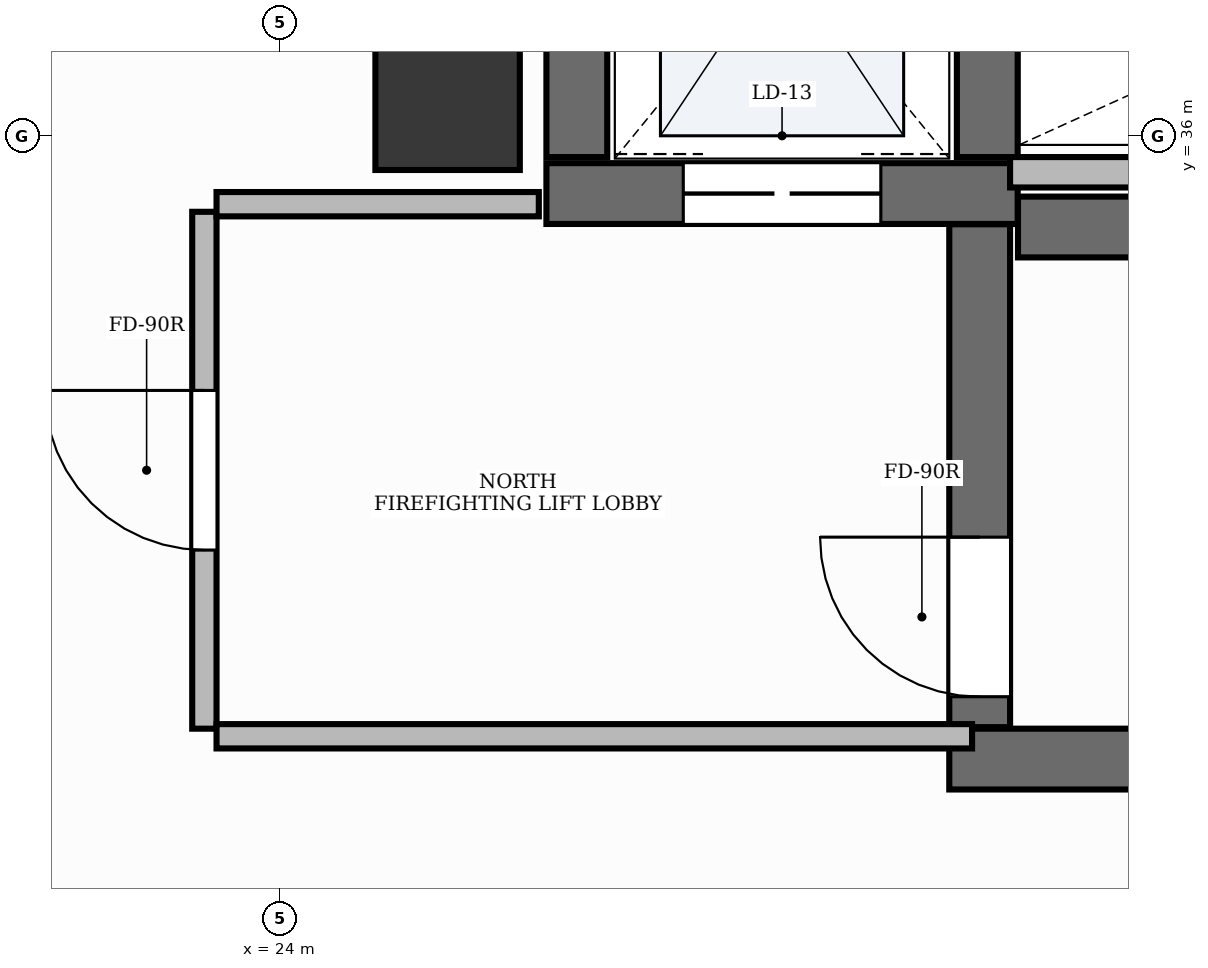
"""IFC4 building model, lengths in metres.
Left out: names, types, materials, properties, quantities, classifications, styles, units other than length and angle.
Written with IfcOpenShell. Run it as: python <this file> out.ifc"""

import sys

from ifc_helpers import new_model, si_unit, direction, frame, frame_2d, origin, origin_2d, place, context, subcontext, project, spatial, rectangle, extrude, element, fill, save


model = new_model("IFC4")
c1 = context("Model", 3, precision=1e-05, world=origin(), true_north=direction((0.0, 1.0)))
c2 = subcontext(c1, "Body", "Model", "MODEL_VIEW")
j1 = project(units=[si_unit("LENGTHUNIT", "METRE"), si_unit("PLANEANGLEUNIT", "RADIAN")], contexts=[c1])
p1 = place(None, origin())
s1 = spatial("IfcSite", under=j1, at=p1, CompositionType="ELEMENT")
p2 = place(p1, origin())
s2 = spatial("IfcBuilding", under=s1, at=p2, CompositionType="ELEMENT")
p3 = place(p2, frame((0.0, 0.0, 154.2)))
s3 = spatial("IfcBuildingStorey", under=s2, at=p3, CompositionType="ELEMENT", Elevation=154.2)
p4 = place(p3, frame((28.852, 35.4, 0.0), z_axis=(0.0, 0.0, 1.0), x_axis=(1.0, 0.0, 0.0)))
e1 = element("IfcWall", 1, at=p4, inside=s3, PredefinedType="SHEAR", context=c2, shape_type="SweptSolid", body=[
    extrude(rectangle(XDim=8.198, YDim=0.4, at=frame_2d((4.099, 0.0))), origin(), (0.0, 0.0, 1.0), 3.9),
])
p5 = place(p3, frame((28.4, 31.9, 0.0), z_axis=(0.0, 0.0, 1.0), x_axis=(1.0, 0.0, 0.0)))
e2 = element("IfcWall", 2, at=p5, inside=s3, PredefinedType="SHEAR", context=c2, shape_type="SweptSolid", body=[
    extrude(rectangle(XDim=8.65, YDim=0.4, at=frame_2d((4.325, 0.0))), origin(), (0.0, 0.0, 1.0), 3.9),
])
p6 = place(p3, frame((28.6, 32.11, 0.0), z_axis=(0.0, 0.0, 1.0), x_axis=(0.0, 1.0, 0.0)))
e3 = element("IfcWall", 3, at=p6, inside=s3, PredefinedType="SHEAR", context=c2, shape_type="SweptSolid", body=[
    extrude(rectangle(XDim=3.308, YDim=0.4, at=frame_2d((1.654, 0.0))), origin(), (0.0, 0.0, 1.0), 3.9),
])
p7 = place(p6, frame((0.2, 0.0, 0.0)))
e4 = element("IfcOpeningElement", 4, at=p7, cuts=e3, PredefinedType="OPENING", context=c2, shape_type="SweptSolid", body=[
    extrude(rectangle(XDim=1.05, YDim=2.15, at=frame_2d((0.525, 1.075))), frame((0.0, 0.215, 0.0), z_axis=(0.0, -1.0, 0.0), x_axis=(1.0, 0.0, 0.0)), (0.0, 0.0, 1.0), 0.43),
])
p8 = place(p3, frame((25.75, 35.62, 0.0), z_axis=(0.0, 0.0, 1.0), x_axis=(1.0, 0.0, 0.0)))
e5 = element("IfcWall", 5, at=p8, inside=s3, PredefinedType="SHEAR", context=c2, shape_type="SweptSolid", body=[
    extrude(rectangle(XDim=3.1, YDim=0.4, at=frame_2d((1.55, 0.0))), origin(), (0.0, 0.0, 1.0), 3.9),
])
p9 = place(p8, frame((0.9, 0.0, 0.0)))
e6 = element("IfcOpeningElement", 6, at=p9, cuts=e5, PredefinedType="OPENING", context=c2, shape_type="SweptSolid", body=[
    extrude(rectangle(XDim=1.3, YDim=2.2, at=frame_2d((0.65, 1.1))), frame((0.0, 0.215, 0.0), z_axis=(0.0, -1.0, 0.0), x_axis=(1.0, 0.0, 0.0)), (0.0, 0.0, 1.0), 0.43),
])
for number, where, z_axis, x_axis in (
    (7, (25.95, 35.86, 0.0), (0.0, 0.0, 1.0), (0.0, 1.0, 0.0)),
    (8, (28.65, 35.86, 0.0), (0.0, 0.0, 1.0), (0.0, 1.0, 0.0)),
):
    element("IfcWall", number, at=place(p3, frame(where, z_axis=z_axis, x_axis=x_axis)), inside=s3, PredefinedType="SHEAR", context=c2, shape_type="SweptSolid", body=[
        extrude(rectangle(XDim=2.7, YDim=0.4, at=frame_2d((1.35, 0.0))), origin(), (0.0, 0.0, 1.0), 3.9),
    ])
p10 = place(p3, frame((25.1, 36.25, -0.0), z_axis=(0.0, 0.0, 1.0), x_axis=(1.0, 0.0, 0.0)))
e9 = element("IfcColumn", 9, at=p10, inside=s3, PredefinedType="PILASTER", context=c2, shape_type="SweptSolid", body=[
    extrude(rectangle(XDim=0.95, YDim=0.95, at=origin_2d()), origin(), (0.0, 0.0, 1.0), 3.901),
])
p11 = place(p3, frame((28.8, 35.76, 0.0), z_axis=(0.0, 0.0, 1.0), x_axis=(1.0, 0.0, 0.0)))
e10 = element("IfcWall", 10, at=p11, inside=s3, PredefinedType="PARTITIONING", context=c2, shape_type="SweptSolid", body=[
    extrude(rectangle(XDim=4.57, YDim=0.2, at=frame_2d((2.285, 0.0))), origin(), (0.0, 0.0, 1.0), 2.91),
])
p12 = place(p3, frame((23.5, 32.1, 0.0), z_axis=(0.0, 0.0, 1.0), x_axis=(0.0, 1.0, 0.0)))
e11 = element("IfcWall", 11, at=p12, inside=s3, PredefinedType="PARTITIONING", context=c2, shape_type="SweptSolid", body=[
    extrude(rectangle(XDim=3.4, YDim=0.16, at=frame_2d((1.7, 0.0))), origin(), (0.0, 0.0, 1.0), 2.91),
])
p13 = place(p12, frame((1.175, 0.0, 0.0)))
e12 = element("IfcOpeningElement", 12, at=p13, cuts=e11, PredefinedType="OPENING", context=c2, shape_type="SweptSolid", body=[
    extrude(rectangle(XDim=1.05, YDim=2.15, at=frame_2d((0.525, 1.075))), frame((0.0, 0.095, 0.0), z_axis=(0.0, -1.0, 0.0), x_axis=(1.0, 0.0, 0.0)), (0.0, 0.0, 1.0), 0.19),
])
p14 = place(p3, frame((23.58, 32.05, 0.0), z_axis=(0.0, 0.0, 1.0), x_axis=(1.0, 0.0, 0.0)))
e13 = element("IfcWall", 13, at=p14, inside=s3, PredefinedType="PARTITIONING", context=c2, shape_type="SweptSolid", body=[
    extrude(rectangle(XDim=4.97, YDim=0.16, at=frame_2d((2.485, 0.0))), origin(), (0.0, 0.0, 1.0), 2.91),
])
p15 = place(p3, frame((23.58, 35.55, 0.0), z_axis=(0.0, 0.0, 1.0), x_axis=(1.0, 0.0, 0.0)))
e14 = element("IfcWall", 14, at=p15, inside=s3, PredefinedType="PARTITIONING", context=c2, shape_type="SweptSolid", body=[
    extrude(rectangle(XDim=2.12, YDim=0.16, at=frame_2d((1.06, 0.0))), origin(), (0.0, 0.0, 1.0), 2.91),
])
p16 = place(p7, origin())
e15 = element("IfcDoor", 15, at=p16, inside=s3, OperationType="SINGLE_SWING_RIGHT", PredefinedType="DOOR", context=c2, shape_type="SweptSolid", body=[
    extrude(rectangle(XDim=1.05, YDim=2.15, at=frame_2d((0.525, 1.075))), frame((0.0, 0.025, 0.0), z_axis=(0.0, -1.0, 0.0), x_axis=(1.0, 0.0, 0.0)), (0.0, 0.0, 1.0), 0.05),
])
fill(e4, e15)
p17 = place(p9, origin())
e16 = element("IfcDoor", 16, at=p17, inside=s3, OperationType="DOUBLE_DOOR_SLIDING", PredefinedType="DOOR", context=c2, shape_type="SweptSolid", body=[
    extrude(rectangle(XDim=1.3, YDim=2.2, at=frame_2d((0.65, 1.1))), frame((0.0, 0.025, 0.0), z_axis=(0.0, -1.0, 0.0), x_axis=(1.0, 0.0, 0.0)), (0.0, 0.0, 1.0), 0.05),
])
fill(e6, e16)
p18 = place(p13, origin())
e17 = element("IfcDoor", 17, at=p18, inside=s3, OperationType="SINGLE_SWING_RIGHT", PredefinedType="DOOR", context=c2, shape_type="SweptSolid", body=[
    extrude(rectangle(XDim=1.05, YDim=2.15, at=frame_2d((0.525, 1.075))), frame((0.0, 0.025, 0.0), z_axis=(0.0, -1.0, 0.0), x_axis=(1.0, 0.0, 0.0)), (0.0, 0.0, 1.0), 0.05),
])
fill(e12, e17)
save(model, sys.argv[1])
